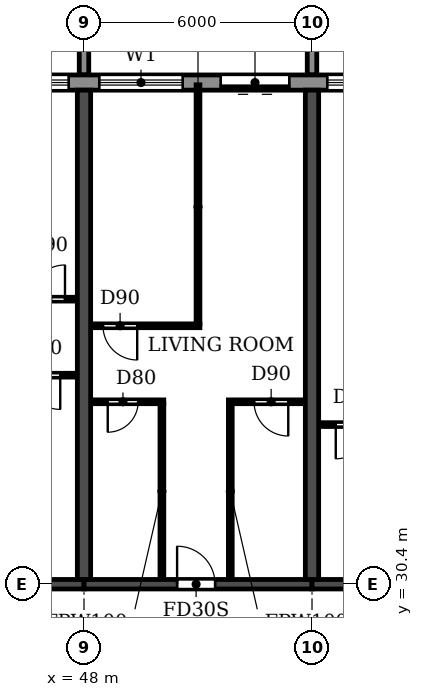
"""IFC4 building model, lengths in metres.
Left out: names, types, materials, properties, quantities, classifications, styles, units other than length and angle.
Written with IfcOpenShell. Run it as: python <this file> out.ifc"""

import sys

from ifc_helpers import new_model, si_unit, direction, frame, frame_2d, origin, place, context, subcontext, project, spatial, polyline, rectangle, outline, extrude, source, transform, mapped, element, fill, save


model = new_model("IFC4")
c1 = context("Model", 3, precision=1e-05, world=origin(), true_north=direction((0.0, 1.0)))
c2 = subcontext(c1, "Body", "Model", "MODEL_VIEW")
j1 = project(units=[si_unit("LENGTHUNIT", "METRE"), si_unit("PLANEANGLEUNIT", "RADIAN")], contexts=[c1])
p1 = place(None, origin())
s1 = spatial("IfcSite", under=j1, at=p1, CompositionType="ELEMENT")
p2 = place(p1, origin())
s2 = spatial("IfcBuilding", under=s1, at=p2, CompositionType="ELEMENT")
p3 = place(p2, frame((0.0, 0.0, 76.2)))
s3 = spatial("IfcBuildingStorey", under=s2, at=p3, CompositionType="ELEMENT", Elevation=76.2)
for number, where, z_axis, x_axis in (
    (1, (48.0, 30.525, 0.0), (0.0, 0.0, 1.0), (0.0, 1.0, 0.0)),
    (2, (54.0, 30.525, 0.0), (0.0, 0.0, 1.0), (0.0, 1.0, 0.0)),
):
    element("IfcWall", number, at=place(p3, frame(where, z_axis=z_axis, x_axis=x_axis)), inside=s3, PredefinedType="SHEAR", context=c2, shape_type="SweptSolid", body=[
        extrude(rectangle(XDim=12.875, YDim=0.35, at=frame_2d((6.438, 0.0))), origin(), (0.0, 0.0, 1.0), 3.06),
    ])
p4 = place(p3, frame((42.0, 30.4, 0.0), z_axis=(0.0, 0.0, 1.0), x_axis=(1.0, 0.0, 0.0)))
e3 = element("IfcWall", 3, at=p4, inside=s3, PredefinedType="SHEAR", context=c2, shape_type="SweptSolid", body=[
    extrude(rectangle(XDim=6.0, YDim=0.25, at=frame_2d((3.0, 0.0))), origin(), (0.0, 0.0, 1.0), 2.46),
])
p5 = place(p4, frame((2.45, 0.0, 0.0)))
e4 = element("IfcOpeningElement", 4, at=p5, cuts=e3, PredefinedType="OPENING", context=c2, shape_type="SweptSolid", body=[
    extrude(rectangle(XDim=1.0, YDim=2.1, at=frame_2d((0.5, 1.05))), frame((0.0, 0.135, 0.0), z_axis=(0.0, -1.0, 0.0), x_axis=(1.0, 0.0, 0.0)), (0.0, 0.0, 1.0), 0.27),
])
p6 = place(p3, frame((48.0, 30.4, 0.0), z_axis=(0.0, 0.0, 1.0), x_axis=(1.0, 0.0, 0.0)))
e5 = element("IfcWall", 5, at=p6, inside=s3, PredefinedType="SHEAR", context=c2, shape_type="SweptSolid", body=[
    extrude(rectangle(XDim=6.0, YDim=0.25, at=frame_2d((3.0, 0.0))), origin(), (0.0, 0.0, 1.0), 2.46),
])
p7 = place(p6, frame((2.45, 0.0, 0.0)))
e6 = element("IfcOpeningElement", 6, at=p7, cuts=e5, PredefinedType="OPENING", context=c2, shape_type="SweptSolid", body=[
    extrude(rectangle(XDim=1.0, YDim=2.1, at=frame_2d((0.5, 1.05))), frame((0.0, 0.135, 0.0), z_axis=(0.0, -1.0, 0.0), x_axis=(1.0, 0.0, 0.0)), (0.0, 0.0, 1.0), 0.27),
])
p8 = place(p3, frame((54.0, 30.4, 0.0), z_axis=(0.0, 0.0, 1.0), x_axis=(1.0, 0.0, 0.0)))
e7 = element("IfcWall", 7, at=p8, inside=s3, PredefinedType="SHEAR", context=c2, shape_type="SweptSolid", body=[
    extrude(rectangle(XDim=6.0, YDim=0.25, at=frame_2d((3.0, 0.0))), origin(), (0.0, 0.0, 1.0), 2.46),
])
p9 = place(p8, frame((2.55, 0.0, 0.0)))
e8 = element("IfcOpeningElement", 8, at=p9, cuts=e7, PredefinedType="OPENING", context=c2, shape_type="SweptSolid", body=[
    extrude(rectangle(XDim=1.0, YDim=2.1, at=frame_2d((0.5, 1.05))), frame((0.0, 0.135, 0.0), z_axis=(0.0, -1.0, 0.0), x_axis=(1.0, 0.0, 0.0)), (0.0, 0.0, 1.0), 0.27),
])
p10 = place(p3, frame((91.317, 43.6, 0.0), z_axis=(0.0, 0.0, 1.0), x_axis=(-1.0, 0.0, 0.0)))
e9 = element("IfcWall", 9, at=p10, inside=s3, PredefinedType="STANDARD", context=c2, shape_type="SweptSolid", body=[
    extrude(rectangle(XDim=80.634, YDim=0.4, at=frame_2d((40.317, 0.0))), origin(), (0.0, 0.0, 1.0), 3.06),
])
p11 = place(p10, frame((76.717, 0.0, 0.9)))
e10 = element("IfcOpeningElement", 10, at=p11, cuts=e9, PredefinedType="OPENING", context=c2, shape_type="SweptSolid", body=[
    extrude(rectangle(XDim=2.2, YDim=1.5, at=frame_2d((1.1, 0.75))), frame((0.0, 0.21, 0.0), z_axis=(0.0, -1.0, 0.0), x_axis=(1.0, 0.0, 0.0)), (0.0, 0.0, 1.0), 0.42),
])
p12 = place(p10, frame((73.917, 0.0, 0.0)))
e11 = element("IfcOpeningElement", 11, at=p12, cuts=e9, PredefinedType="OPENING", context=c2, shape_type="SweptSolid", body=[
    extrude(rectangle(XDim=1.8, YDim=2.4, at=frame_2d((0.9, 1.2))), frame((0.0, 0.21, 0.0), z_axis=(0.0, -1.0, 0.0), x_axis=(1.0, 0.0, 0.0)), (0.0, 0.0, 1.0), 0.42),
])
p13 = place(p10, frame((70.917, 0.0, 0.0)))
e12 = element("IfcOpeningElement", 12, at=p13, cuts=e9, PredefinedType="OPENING", context=c2, shape_type="SweptSolid", body=[
    extrude(rectangle(XDim=1.8, YDim=2.4, at=frame_2d((0.9, 1.2))), frame((0.0, 0.21, 0.0), z_axis=(0.0, -1.0, 0.0), x_axis=(1.0, 0.0, 0.0)), (0.0, 0.0, 1.0), 0.42),
])
p14 = place(p10, frame((67.717, 0.0, 0.9)))
e13 = element("IfcOpeningElement", 13, at=p14, cuts=e9, PredefinedType="OPENING", context=c2, shape_type="SweptSolid", body=[
    extrude(rectangle(XDim=2.2, YDim=1.5, at=frame_2d((1.1, 0.75))), frame((0.0, 0.21, 0.0), z_axis=(0.0, -1.0, 0.0), x_axis=(1.0, 0.0, 0.0)), (0.0, 0.0, 1.0), 0.42),
])
p15 = place(p10, frame((64.717, 0.0, 0.9)))
e14 = element("IfcOpeningElement", 14, at=p15, cuts=e9, PredefinedType="OPENING", context=c2, shape_type="SweptSolid", body=[
    extrude(rectangle(XDim=2.2, YDim=1.5, at=frame_2d((1.1, 0.75))), frame((0.0, 0.21, 0.0), z_axis=(0.0, -1.0, 0.0), x_axis=(1.0, 0.0, 0.0)), (0.0, 0.0, 1.0), 0.42),
])
p16 = place(p10, frame((61.917, 0.0, 0.0)))
e15 = element("IfcOpeningElement", 15, at=p16, cuts=e9, PredefinedType="OPENING", context=c2, shape_type="SweptSolid", body=[
    extrude(rectangle(XDim=1.8, YDim=2.4, at=frame_2d((0.9, 1.2))), frame((0.0, 0.21, 0.0), z_axis=(0.0, -1.0, 0.0), x_axis=(1.0, 0.0, 0.0)), (0.0, 0.0, 1.0), 0.42),
])
p17 = place(p10, frame((58.717, 0.0, 0.9)))
e16 = element("IfcOpeningElement", 16, at=p17, cuts=e9, PredefinedType="OPENING", context=c2, shape_type="SweptSolid", body=[
    extrude(rectangle(XDim=2.2, YDim=1.5, at=frame_2d((1.1, 0.75))), frame((0.0, 0.21, 0.0), z_axis=(0.0, -1.0, 0.0), x_axis=(1.0, 0.0, 0.0)), (0.0, 0.0, 1.0), 0.42),
])
p18 = place(p10, frame((55.917, 0.0, 0.0)))
e17 = element("IfcOpeningElement", 17, at=p18, cuts=e9, PredefinedType="OPENING", context=c2, shape_type="SweptSolid", body=[
    extrude(rectangle(XDim=1.8, YDim=2.4, at=frame_2d((0.9, 1.2))), frame((0.0, 0.21, 0.0), z_axis=(0.0, -1.0, 0.0), x_axis=(1.0, 0.0, 0.0)), (0.0, 0.0, 1.0), 0.42),
])
p19 = place(p10, frame((52.717, 0.0, 0.9)))
e18 = element("IfcOpeningElement", 18, at=p19, cuts=e9, PredefinedType="OPENING", context=c2, shape_type="SweptSolid", body=[
    extrude(rectangle(XDim=2.2, YDim=1.5, at=frame_2d((1.1, 0.75))), frame((0.0, 0.21, 0.0), z_axis=(0.0, -1.0, 0.0), x_axis=(1.0, 0.0, 0.0)), (0.0, 0.0, 1.0), 0.42),
])
p20 = place(p10, frame((49.717, 0.0, 0.9)))
e19 = element("IfcOpeningElement", 19, at=p20, cuts=e9, PredefinedType="OPENING", context=c2, shape_type="SweptSolid", body=[
    extrude(rectangle(XDim=2.2, YDim=1.5, at=frame_2d((1.1, 0.75))), frame((0.0, 0.21, 0.0), z_axis=(0.0, -1.0, 0.0), x_axis=(1.0, 0.0, 0.0)), (0.0, 0.0, 1.0), 0.42),
])
p21 = place(p10, frame((46.917, 0.0, 0.0)))
e20 = element("IfcOpeningElement", 20, at=p21, cuts=e9, PredefinedType="OPENING", context=c2, shape_type="SweptSolid", body=[
    extrude(rectangle(XDim=1.8, YDim=2.4, at=frame_2d((0.9, 1.2))), frame((0.0, 0.21, 0.0), z_axis=(0.0, -1.0, 0.0), x_axis=(1.0, 0.0, 0.0)), (0.0, 0.0, 1.0), 0.42),
])
p22 = place(p10, frame((43.717, 0.0, 0.9)))
e21 = element("IfcOpeningElement", 21, at=p22, cuts=e9, PredefinedType="OPENING", context=c2, shape_type="SweptSolid", body=[
    extrude(rectangle(XDim=2.2, YDim=1.5, at=frame_2d((1.1, 0.75))), frame((0.0, 0.21, 0.0), z_axis=(0.0, -1.0, 0.0), x_axis=(1.0, 0.0, 0.0)), (0.0, 0.0, 1.0), 0.42),
])
p23 = place(p10, frame((40.717, 0.0, 0.9)))
e22 = element("IfcOpeningElement", 22, at=p23, cuts=e9, PredefinedType="OPENING", context=c2, shape_type="SweptSolid", body=[
    extrude(rectangle(XDim=2.2, YDim=1.5, at=frame_2d((1.1, 0.75))), frame((0.0, 0.21, 0.0), z_axis=(0.0, -1.0, 0.0), x_axis=(1.0, 0.0, 0.0)), (0.0, 0.0, 1.0), 0.42),
])
p24 = place(p10, frame((37.917, 0.0, 0.0)))
e23 = element("IfcOpeningElement", 23, at=p24, cuts=e9, PredefinedType="OPENING", context=c2, shape_type="SweptSolid", body=[
    extrude(rectangle(XDim=1.8, YDim=2.4, at=frame_2d((0.9, 1.2))), frame((0.0, 0.21, 0.0), z_axis=(0.0, -1.0, 0.0), x_axis=(1.0, 0.0, 0.0)), (0.0, 0.0, 1.0), 0.42),
])
p25 = place(p10, frame((34.717, 0.0, 0.9)))
e24 = element("IfcOpeningElement", 24, at=p25, cuts=e9, PredefinedType="OPENING", context=c2, shape_type="SweptSolid", body=[
    extrude(rectangle(XDim=2.2, YDim=1.5, at=frame_2d((1.1, 0.75))), frame((0.0, 0.21, 0.0), z_axis=(0.0, -1.0, 0.0), x_axis=(1.0, 0.0, 0.0)), (0.0, 0.0, 1.0), 0.42),
])
p26 = place(p10, frame((31.917, 0.0, 0.0)))
e25 = element("IfcOpeningElement", 25, at=p26, cuts=e9, PredefinedType="OPENING", context=c2, shape_type="SweptSolid", body=[
    extrude(rectangle(XDim=1.8, YDim=2.4, at=frame_2d((0.9, 1.2))), frame((0.0, 0.21, 0.0), z_axis=(0.0, -1.0, 0.0), x_axis=(1.0, 0.0, 0.0)), (0.0, 0.0, 1.0), 0.42),
])
p27 = place(p10, frame((28.717, 0.0, 0.9)))
e26 = element("IfcOpeningElement", 26, at=p27, cuts=e9, PredefinedType="OPENING", context=c2, shape_type="SweptSolid", body=[
    extrude(rectangle(XDim=2.2, YDim=1.5, at=frame_2d((1.1, 0.75))), frame((0.0, 0.21, 0.0), z_axis=(0.0, -1.0, 0.0), x_axis=(1.0, 0.0, 0.0)), (0.0, 0.0, 1.0), 0.42),
])
p28 = place(p10, frame((25.717, 0.0, 0.9)))
e27 = element("IfcOpeningElement", 27, at=p28, cuts=e9, PredefinedType="OPENING", context=c2, shape_type="SweptSolid", body=[
    extrude(rectangle(XDim=2.2, YDim=1.5, at=frame_2d((1.1, 0.75))), frame((0.0, 0.21, 0.0), z_axis=(0.0, -1.0, 0.0), x_axis=(1.0, 0.0, 0.0)), (0.0, 0.0, 1.0), 0.42),
])
p29 = place(p10, frame((22.717, 0.0, 0.9)))
e28 = element("IfcOpeningElement", 28, at=p29, cuts=e9, PredefinedType="OPENING", context=c2, shape_type="SweptSolid", body=[
    extrude(rectangle(XDim=2.2, YDim=1.5, at=frame_2d((1.1, 0.75))), frame((0.0, 0.21, 0.0), z_axis=(0.0, -1.0, 0.0), x_axis=(1.0, 0.0, 0.0)), (0.0, 0.0, 1.0), 0.42),
])
p30 = place(p10, frame((19.917, 0.0, 0.0)))
e29 = element("IfcOpeningElement", 29, at=p30, cuts=e9, PredefinedType="OPENING", context=c2, shape_type="SweptSolid", body=[
    extrude(rectangle(XDim=1.8, YDim=2.4, at=frame_2d((0.9, 1.2))), frame((0.0, 0.21, 0.0), z_axis=(0.0, -1.0, 0.0), x_axis=(1.0, 0.0, 0.0)), (0.0, 0.0, 1.0), 0.42),
])
p31 = place(p10, frame((16.717, 0.0, 0.9)))
e30 = element("IfcOpeningElement", 30, at=p31, cuts=e9, PredefinedType="OPENING", context=c2, shape_type="SweptSolid", body=[
    extrude(rectangle(XDim=2.2, YDim=1.5, at=frame_2d((1.1, 0.75))), frame((0.0, 0.21, 0.0), z_axis=(0.0, -1.0, 0.0), x_axis=(1.0, 0.0, 0.0)), (0.0, 0.0, 1.0), 0.42),
])
p32 = place(p10, frame((13.717, 0.0, 0.9)))
e31 = element("IfcOpeningElement", 31, at=p32, cuts=e9, PredefinedType="OPENING", context=c2, shape_type="SweptSolid", body=[
    extrude(rectangle(XDim=2.2, YDim=1.5, at=frame_2d((1.1, 0.75))), frame((0.0, 0.21, 0.0), z_axis=(0.0, -1.0, 0.0), x_axis=(1.0, 0.0, 0.0)), (0.0, 0.0, 1.0), 0.42),
])
p33 = place(p10, frame((10.717, 0.0, 0.9)))
e32 = element("IfcOpeningElement", 32, at=p33, cuts=e9, PredefinedType="OPENING", context=c2, shape_type="SweptSolid", body=[
    extrude(rectangle(XDim=2.2, YDim=1.5, at=frame_2d((1.1, 0.75))), frame((0.0, 0.21, 0.0), z_axis=(0.0, -1.0, 0.0), x_axis=(1.0, 0.0, 0.0)), (0.0, 0.0, 1.0), 0.42),
])
p34 = place(p10, frame((7.917, 0.0, 0.0)))
e33 = element("IfcOpeningElement", 33, at=p34, cuts=e9, PredefinedType="OPENING", context=c2, shape_type="SweptSolid", body=[
    extrude(rectangle(XDim=1.8, YDim=2.4, at=frame_2d((0.9, 1.2))), frame((0.0, 0.21, 0.0), z_axis=(0.0, -1.0, 0.0), x_axis=(1.0, 0.0, 0.0)), (0.0, 0.0, 1.0), 0.42),
])
p35 = place(p10, frame((4.717, 0.0, 0.9)))
e34 = element("IfcOpeningElement", 34, at=p35, cuts=e9, PredefinedType="OPENING", context=c2, shape_type="SweptSolid", body=[
    extrude(rectangle(XDim=2.2, YDim=1.5, at=frame_2d((1.1, 0.75))), frame((0.0, 0.21, 0.0), z_axis=(0.0, -1.0, 0.0), x_axis=(1.0, 0.0, 0.0)), (0.0, 0.0, 1.0), 0.42),
])
p36 = place(p10, frame((1.917, 0.0, 0.0)))
e35 = element("IfcOpeningElement", 35, at=p36, cuts=e9, PredefinedType="OPENING", context=c2, shape_type="SweptSolid", body=[
    extrude(rectangle(XDim=1.8, YDim=2.4, at=frame_2d((0.9, 1.2))), frame((0.0, 0.21, 0.0), z_axis=(0.0, -1.0, 0.0), x_axis=(1.0, 0.0, 0.0)), (0.0, 0.0, 1.0), 0.42),
])
m1 = source(origin(), c2, "Body", "SweptSolid", [
    extrude(outline(polyline([(0.0, 0.0), (0.25, 0.0), (0.25, 3.1), (0.0, 3.1), (0.0, 0.0)])), origin(), (0.0, 0.0, 1.0), 3.1),
])
for number, where in (
    (36, (47.875, 43.8, 0.0)),
    (37, (53.875, 43.8, 0.0)),
):
    element("IfcWall", number, at=place(p3, frame(where)), inside=s3, PredefinedType="STANDARD", context=c2, shape_type="MappedRepresentation", body=[
        mapped(m1, transform((0.0, 0.0, 0.0))),
    ])
p37 = place(p3, frame((54.185, 34.6, 0.0), z_axis=(0.0, 0.0, 1.0), x_axis=(1.0, 0.0, 0.0)))
e38 = element("IfcWall", 38, at=p37, inside=s3, PredefinedType="PARTITIONING", context=c2, shape_type="SweptSolid", body=[
    extrude(rectangle(XDim=2.015, YDim=0.1, at=frame_2d((1.007, 0.0))), origin(), (0.0, 0.0, 1.0), 3.06),
])
p38 = place(p37, frame((0.44, 0.0, 0.0)))
e39 = element("IfcOpeningElement", 39, at=p38, cuts=e38, PredefinedType="OPENING", context=c2, shape_type="SweptSolid", body=[
    extrude(rectangle(XDim=0.9, YDim=2.1, at=frame_2d((0.45, 1.05))), frame((0.0, 0.06, 0.0), z_axis=(0.0, -1.0, 0.0), x_axis=(1.0, 0.0, 0.0)), (0.0, 0.0, 1.0), 0.12),
])
p39 = place(p3, frame((48.185, 35.2, 0.0), z_axis=(0.0, 0.0, 1.0), x_axis=(1.0, 0.0, 0.0)))
e40 = element("IfcWall", 40, at=p39, inside=s3, PredefinedType="PARTITIONING", context=c2, shape_type="SweptSolid", body=[
    extrude(rectangle(XDim=1.915, YDim=0.1, at=frame_2d((0.958, 0.0))), origin(), (0.0, 0.0, 1.0), 3.06),
])
p40 = place(p39, frame((0.44, 0.0, 0.0)))
e41 = element("IfcOpeningElement", 41, at=p40, cuts=e40, PredefinedType="OPENING", context=c2, shape_type="SweptSolid", body=[
    extrude(rectangle(XDim=0.8, YDim=2.1, at=frame_2d((0.4, 1.05))), frame((0.0, 0.06, 0.0), z_axis=(0.0, -1.0, 0.0), x_axis=(1.0, 0.0, 0.0)), (0.0, 0.0, 1.0), 0.12),
])
p41 = place(p3, frame((51.8, 35.2, 0.0), z_axis=(0.0, 0.0, 1.0), x_axis=(1.0, 0.0, 0.0)))
e42 = element("IfcWall", 42, at=p41, inside=s3, PredefinedType="PARTITIONING", context=c2, shape_type="SweptSolid", body=[
    extrude(rectangle(XDim=2.015, YDim=0.1, at=frame_2d((1.007, 0.0))), origin(), (0.0, 0.0, 1.0), 3.06),
])
p42 = place(p41, frame((0.675, 0.0, 0.0)))
e43 = element("IfcOpeningElement", 43, at=p42, cuts=e42, PredefinedType="OPENING", context=c2, shape_type="SweptSolid", body=[
    extrude(rectangle(XDim=0.9, YDim=2.1, at=frame_2d((0.45, 1.05))), frame((0.0, 0.06, 0.0), z_axis=(0.0, -1.0, 0.0), x_axis=(1.0, 0.0, 0.0)), (0.0, 0.0, 1.0), 0.12),
])
p43 = place(p3, frame((45.8, 35.9, 0.0), z_axis=(0.0, 0.0, 1.0), x_axis=(1.0, 0.0, 0.0)))
e44 = element("IfcWall", 44, at=p43, inside=s3, PredefinedType="PARTITIONING", context=c2, shape_type="SweptSolid", body=[
    extrude(rectangle(XDim=2.015, YDim=0.1, at=frame_2d((1.007, 0.0))), origin(), (0.0, 0.0, 1.0), 3.06),
])
p44 = place(p43, frame((0.675, 0.0, 0.0)))
e45 = element("IfcOpeningElement", 45, at=p44, cuts=e44, PredefinedType="OPENING", context=c2, shape_type="SweptSolid", body=[
    extrude(rectangle(XDim=0.9, YDim=2.1, at=frame_2d((0.45, 1.05))), frame((0.0, 0.06, 0.0), z_axis=(0.0, -1.0, 0.0), x_axis=(1.0, 0.0, 0.0)), (0.0, 0.0, 1.0), 0.12),
])
p45 = place(p3, frame((48.185, 37.2, 0.0), z_axis=(0.0, 0.0, 1.0), x_axis=(1.0, 0.0, 0.0)))
e46 = element("IfcWall", 46, at=p45, inside=s3, PredefinedType="PARTITIONING", context=c2, shape_type="SweptSolid", body=[
    extrude(rectangle(XDim=2.865, YDim=0.1, at=frame_2d((1.433, 0.0))), origin(), (0.0, 0.0, 1.0), 3.06),
])
p46 = place(p45, frame((0.315, 0.0, 0.0)))
e47 = element("IfcOpeningElement", 47, at=p46, cuts=e46, PredefinedType="OPENING", context=c2, shape_type="SweptSolid", body=[
    extrude(rectangle(XDim=0.9, YDim=2.1, at=frame_2d((0.45, 1.05))), frame((0.0, 0.06, 0.0), z_axis=(0.0, -1.0, 0.0), x_axis=(1.0, 0.0, 0.0)), (0.0, 0.0, 1.0), 0.12),
])
p47 = place(p3, frame((44.95, 37.9, 0.0), z_axis=(0.0, 0.0, 1.0), x_axis=(1.0, 0.0, 0.0)))
e48 = element("IfcWall", 48, at=p47, inside=s3, PredefinedType="PARTITIONING", context=c2, shape_type="SweptSolid", body=[
    extrude(rectangle(XDim=2.865, YDim=0.1, at=frame_2d((1.433, 0.0))), origin(), (0.0, 0.0, 1.0), 3.06),
])
p48 = place(p47, frame((1.65, 0.0, 0.0)))
e49 = element("IfcOpeningElement", 49, at=p48, cuts=e48, PredefinedType="OPENING", context=c2, shape_type="SweptSolid", body=[
    extrude(rectangle(XDim=0.9, YDim=2.1, at=frame_2d((0.45, 1.05))), frame((0.0, 0.06, 0.0), z_axis=(0.0, -1.0, 0.0), x_axis=(1.0, 0.0, 0.0)), (0.0, 0.0, 1.0), 0.12),
])
p49 = place(p3, frame((50.05, 30.535, 0.0), z_axis=(0.0, 0.0, 1.0), x_axis=(0.0, 1.0, 0.0)))
e50 = element("IfcWall", 50, at=p49, inside=s3, PredefinedType="PARTITIONING", context=c2, shape_type="SweptSolid", body=[
    extrude(rectangle(XDim=4.615, YDim=0.1, at=frame_2d((2.308, 0.0))), origin(), (0.0, 0.0, 1.0), 3.06),
])
p50 = place(p3, frame((51.0, 37.25, 0.0), z_axis=(0.0, 0.0, 1.0), x_axis=(0.0, 1.0, 0.0)))
e51 = element("IfcWall", 51, at=p50, inside=s3, PredefinedType="PARTITIONING", context=c2, shape_type="SweptSolid", body=[
    extrude(rectangle(XDim=6.29, YDim=0.1, at=frame_2d((3.145, 0.0))), origin(), (0.0, 0.0, 1.0), 3.06),
])
p51 = place(p3, frame((51.85, 30.535, 0.0), z_axis=(0.0, 0.0, 1.0), x_axis=(0.0, 1.0, 0.0)))
e52 = element("IfcWall", 52, at=p51, inside=s3, PredefinedType="PARTITIONING", context=c2, shape_type="SweptSolid", body=[
    extrude(rectangle(XDim=4.615, YDim=0.1, at=frame_2d((2.308, 0.0))), origin(), (0.0, 0.0, 1.0), 3.06),
])
p52 = place(p22, origin())
e53 = element("IfcWindow", 53, at=p52, inside=s3, PartitioningType="DOUBLE_PANEL_HORIZONTAL", PredefinedType="WINDOW", context=c2, shape_type="SweptSolid", body=[
    extrude(rectangle(XDim=2.2, YDim=1.5, at=frame_2d((1.1, 0.75))), frame((0.0, 0.03, 0.0), z_axis=(0.0, -1.0, 0.0), x_axis=(1.0, 0.0, 0.0)), (0.0, 0.0, 1.0), 0.06),
])
fill(e21, e53)
p53 = place(p23, origin())
e54 = element("IfcWindow", 54, at=p53, inside=s3, PartitioningType="DOUBLE_PANEL_HORIZONTAL", PredefinedType="WINDOW", context=c2, shape_type="SweptSolid", body=[
    extrude(rectangle(XDim=2.2, YDim=1.5, at=frame_2d((1.1, 0.75))), frame((0.0, 0.03, 0.0), z_axis=(0.0, -1.0, 0.0), x_axis=(1.0, 0.0, 0.0)), (0.0, 0.0, 1.0), 0.06),
])
fill(e22, e54)
p54 = place(p24, origin())
e55 = element("IfcDoor", 55, at=p54, inside=s3, OperationType="DOUBLE_DOOR_SLIDING", PredefinedType="DOOR", context=c2, shape_type="SweptSolid", body=[
    extrude(rectangle(XDim=1.8, YDim=2.4, at=frame_2d((0.9, 1.2))), frame((0.0, 0.025, 0.0), z_axis=(0.0, -1.0, 0.0), x_axis=(1.0, 0.0, 0.0)), (0.0, 0.0, 1.0), 0.05),
])
fill(e23, e55)
p55 = place(p25, origin())
e56 = element("IfcWindow", 56, at=p55, inside=s3, PartitioningType="DOUBLE_PANEL_HORIZONTAL", PredefinedType="WINDOW", context=c2, shape_type="SweptSolid", body=[
    extrude(rectangle(XDim=2.2, YDim=1.5, at=frame_2d((1.1, 0.75))), frame((0.0, 0.03, 0.0), z_axis=(0.0, -1.0, 0.0), x_axis=(1.0, 0.0, 0.0)), (0.0, 0.0, 1.0), 0.06),
])
fill(e24, e56)
p56 = place(p44, frame((0.9, 0.0, 0.0), z_axis=(0.0, 0.0, 1.0), x_axis=(-1.0, 0.0, 0.0)))
e57 = element("IfcDoor", 57, at=p56, inside=s3, OperationType="SINGLE_SWING_LEFT", PredefinedType="DOOR", context=c2, shape_type="SweptSolid", body=[
    extrude(rectangle(XDim=0.9, YDim=2.1, at=frame_2d((0.45, 1.05))), frame((0.0, 0.025, 0.0), z_axis=(0.0, -1.0, 0.0), x_axis=(1.0, 0.0, 0.0)), (0.0, 0.0, 1.0), 0.05),
])
fill(e45, e57)
p57 = place(p48, origin())
e58 = element("IfcDoor", 58, at=p57, inside=s3, OperationType="SINGLE_SWING_RIGHT", PredefinedType="DOOR", context=c2, shape_type="SweptSolid", body=[
    extrude(rectangle(XDim=0.9, YDim=2.1, at=frame_2d((0.45, 1.05))), frame((0.0, 0.025, 0.0), z_axis=(0.0, -1.0, 0.0), x_axis=(1.0, 0.0, 0.0)), (0.0, 0.0, 1.0), 0.05),
])
fill(e49, e58)
p58 = place(p46, frame((0.9, 0.0, 0.0), z_axis=(0.0, 0.0, 1.0), x_axis=(-1.0, 0.0, 0.0)))
e59 = element("IfcDoor", 59, at=p58, inside=s3, OperationType="SINGLE_SWING_LEFT", PredefinedType="DOOR", context=c2, shape_type="SweptSolid", body=[
    extrude(rectangle(XDim=0.9, YDim=2.1, at=frame_2d((0.45, 1.05))), frame((0.0, 0.025, 0.0), z_axis=(0.0, -1.0, 0.0), x_axis=(1.0, 0.0, 0.0)), (0.0, 0.0, 1.0), 0.05),
])
fill(e47, e59)
p59 = place(p40, frame((0.8, 0.0, 0.0), z_axis=(0.0, 0.0, 1.0), x_axis=(-1.0, 0.0, 0.0)))
e60 = element("IfcDoor", 60, at=p59, inside=s3, OperationType="SINGLE_SWING_RIGHT", PredefinedType="DOOR", context=c2, shape_type="SweptSolid", body=[
    extrude(rectangle(XDim=0.8, YDim=2.1, at=frame_2d((0.4, 1.05))), frame((0.0, 0.025, 0.0), z_axis=(0.0, -1.0, 0.0), x_axis=(1.0, 0.0, 0.0)), (0.0, 0.0, 1.0), 0.05),
])
fill(e41, e60)
p60 = place(p7, origin())
e61 = element("IfcDoor", 61, at=p60, inside=s3, OperationType="SINGLE_SWING_LEFT", PredefinedType="DOOR", context=c2, shape_type="SweptSolid", body=[
    extrude(rectangle(XDim=1.0, YDim=2.1, at=frame_2d((0.5, 1.05))), frame((0.0, 0.025, 0.0), z_axis=(0.0, -1.0, 0.0), x_axis=(1.0, 0.0, 0.0)), (0.0, 0.0, 1.0), 0.05),
])
fill(e6, e61)
p61 = place(p42, frame((0.9, 0.0, 0.0), z_axis=(0.0, 0.0, 1.0), x_axis=(-1.0, 0.0, 0.0)))
e62 = element("IfcDoor", 62, at=p61, inside=s3, OperationType="SINGLE_SWING_LEFT", PredefinedType="DOOR", context=c2, shape_type="SweptSolid", body=[
    extrude(rectangle(XDim=0.9, YDim=2.1, at=frame_2d((0.45, 1.05))), frame((0.0, 0.025, 0.0), z_axis=(0.0, -1.0, 0.0), x_axis=(1.0, 0.0, 0.0)), (0.0, 0.0, 1.0), 0.05),
])
fill(e43, e62)
p62 = place(p38, frame((0.9, 0.0, 0.0), z_axis=(0.0, 0.0, 1.0), x_axis=(-1.0, 0.0, 0.0)))
e63 = element("IfcDoor", 63, at=p62, inside=s3, OperationType="SINGLE_SWING_RIGHT", PredefinedType="DOOR", context=c2, shape_type="SweptSolid", body=[
    extrude(rectangle(XDim=0.9, YDim=2.1, at=frame_2d((0.45, 1.05))), frame((0.0, 0.025, 0.0), z_axis=(0.0, -1.0, 0.0), x_axis=(1.0, 0.0, 0.0)), (0.0, 0.0, 1.0), 0.05),
])
fill(e39, e63)
save(model, sys.argv[1])
